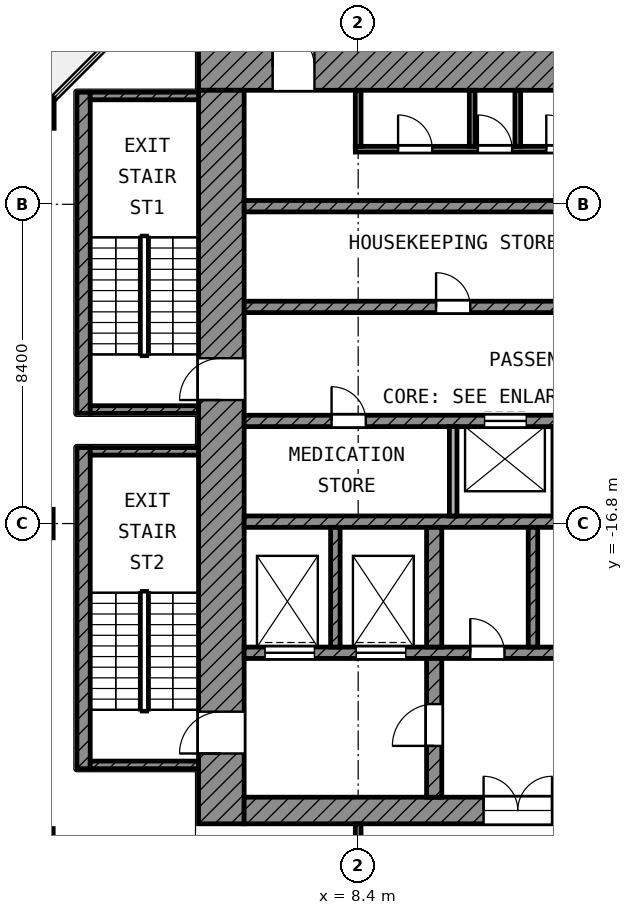
"""IFC4 building model, lengths in metres.
Left out: names, types, materials, properties, quantities, classifications, styles, units other than length and angle.
Written with IfcOpenShell. Run it as: python <this file> out.ifc"""

import sys

from ifc_helpers import new_model, si_unit, direction, frame, frame_2d, origin, origin_2d, place, context, subcontext, project, spatial, rectangle, extrude, element, fill, save


model = new_model("IFC4")
c1 = context("Model", 3, precision=1e-05, world=origin(), true_north=direction((0.0, 1.0)))
c2 = subcontext(c1, "Body", "Model", "MODEL_VIEW")
j1 = project(units=[si_unit("LENGTHUNIT", "METRE"), si_unit("PLANEANGLEUNIT", "RADIAN")], contexts=[c1])
p1 = place(None, origin())
s1 = spatial("IfcSite", under=j1, at=p1, CompositionType="ELEMENT")
p2 = place(p1, origin())
s2 = spatial("IfcBuilding", under=s1, at=p2, CompositionType="ELEMENT")
p3 = place(p2, frame((0.0, 0.0, 323.8)))
s3 = spatial("IfcBuildingStorey", under=s2, at=p3, CompositionType="ELEMENT", Elevation=323.8)
p4 = place(p3, frame((0.0, -6.0, 0.0), z_axis=(0.0, 0.0, 1.0), x_axis=(1.0, 0.0, 0.0)))
e1 = element("IfcColumn", 1, at=p4, inside=s3, PredefinedType="COLUMN", context=c2, shape_type="SweptSolid", body=[
    extrude(rectangle(XDim=0.8, YDim=0.8, at=origin_2d()), origin(), (0.0, 0.0, 1.0), 4.2),
])
for number, where, z_axis, x_axis in (
    (2, (0.0, -16.8, 0.0), (0.0, 0.0, 1.0), (1.0, 0.0, 0.0)),
    (3, (0.0, -25.2, 0.0), (0.0, 0.0, 1.0), (1.0, 0.0, 0.0)),
):
    element("IfcColumn", number, at=place(p3, frame(where, z_axis=z_axis, x_axis=x_axis)), inside=s3, PredefinedType="COLUMN", context=c2, shape_type="SweptSolid", body=[
        extrude(rectangle(XDim=0.75, YDim=0.75, at=origin_2d()), origin(), (0.0, 0.0, 1.0), 4.2),
    ])
p5 = place(p3, frame((4.2, -4.8, 0.0), z_axis=(0.0, 0.0, 1.0), x_axis=(1.0, 0.0, 0.0)))
e4 = element("IfcWall", 4, at=p5, inside=s3, PredefinedType="SHEAR", context=c2, shape_type="SweptSolid", body=[
    extrude(rectangle(XDim=20.5, YDim=1.2, at=frame_2d((10.25, 0.0))), origin(), (0.0, 0.0, 1.0), 3.6),
])
p6 = place(p5, frame((1.95, 0.0, 0.0)))
e5 = element("IfcOpeningElement", 5, at=p6, cuts=e4, PredefinedType="OPENING", context=c2, shape_type="SweptSolid", body=[
    extrude(rectangle(XDim=1.1, YDim=2.1, at=frame_2d((0.55, 1.05))), frame((0.0, 0.61, 0.0), z_axis=(0.0, -1.0, 0.0), x_axis=(1.0, 0.0, 0.0)), (0.0, 0.0, 1.0), 1.22),
])
p7 = place(p5, frame((17.95, 0.0, 0.0)))
e6 = element("IfcOpeningElement", 6, at=p7, cuts=e4, PredefinedType="OPENING", context=c2, shape_type="SweptSolid", body=[
    extrude(rectangle(XDim=1.1, YDim=2.1, at=frame_2d((0.55, 1.05))), frame((0.0, 0.61, 0.0), z_axis=(0.0, -1.0, 0.0), x_axis=(1.0, 0.0, 0.0)), (0.0, 0.0, 1.0), 1.22),
])
p8 = place(p3, frame((4.8, -24.7, 0.0), z_axis=(0.0, 0.0, 1.0), x_axis=(0.0, 1.0, 0.0)))
e7 = element("IfcWall", 7, at=p8, inside=s3, PredefinedType="SHEAR", context=c2, shape_type="SweptSolid", body=[
    extrude(rectangle(XDim=19.3, YDim=1.2, at=frame_2d((9.65, 0.0))), origin(), (0.0, 0.0, 1.0), 3.6),
])
p9 = place(p8, frame((11.15, 0.0, 0.0)))
e8 = element("IfcOpeningElement", 8, at=p9, cuts=e7, PredefinedType="OPENING", context=c2, shape_type="SweptSolid", body=[
    extrude(rectangle(XDim=1.1, YDim=2.1, at=frame_2d((0.55, 1.05))), frame((0.0, 0.61, 0.0), z_axis=(0.0, -1.0, 0.0), x_axis=(1.0, 0.0, 0.0)), (0.0, 0.0, 1.0), 1.22),
])
p10 = place(p8, frame((1.85, 0.0, 0.0)))
e9 = element("IfcOpeningElement", 9, at=p10, cuts=e7, PredefinedType="OPENING", context=c2, shape_type="SweptSolid", body=[
    extrude(rectangle(XDim=1.1, YDim=2.1, at=frame_2d((0.55, 1.05))), frame((0.0, 0.61, 0.0), z_axis=(0.0, -1.0, 0.0), x_axis=(1.0, 0.0, 0.0)), (0.0, 0.0, 1.0), 1.22),
])
p11 = place(p3, frame((5.4, -24.35, 0.0), z_axis=(0.0, 0.0, 1.0), x_axis=(1.0, 0.0, 0.0)))
e10 = element("IfcWall", 10, at=p11, inside=s3, PredefinedType="SHEAR", context=c2, shape_type="SweptSolid", body=[
    extrude(rectangle(XDim=18.6, YDim=0.7, at=frame_2d((9.3, 0.0))), origin(), (0.0, 0.0, 1.0), 3.6),
])
p12 = place(p11, frame((6.3, 0.0, 0.0)))
e11 = element("IfcOpeningElement", 11, at=p12, cuts=e10, PredefinedType="OPENING", context=c2, shape_type="SweptSolid", body=[
    extrude(rectangle(XDim=1.8, YDim=2.1, at=frame_2d((0.9, 1.05))), frame((0.0, 0.36, 0.0), z_axis=(0.0, -1.0, 0.0), x_axis=(1.0, 0.0, 0.0)), (0.0, 0.0, 1.0), 0.72),
])
p13 = place(p3, frame((5.4, -8.45, 0.0), z_axis=(0.0, 0.0, 1.0), x_axis=(1.0, 0.0, 0.0)))
e12 = element("IfcWall", 12, at=p13, inside=s3, PredefinedType="SHEAR", context=c2, shape_type="SweptSolid", body=[
    extrude(rectangle(XDim=16.65, YDim=0.3, at=frame_2d((8.325, 0.0))), origin(), (0.0, 0.0, 1.0), 3.6),
])
p14 = place(p3, frame((5.4, -11.1, 0.0), z_axis=(0.0, 0.0, 1.0), x_axis=(1.0, 0.0, 0.0)))
e13 = element("IfcWall", 13, at=p14, inside=s3, PredefinedType="SHEAR", context=c2, shape_type="SweptSolid", body=[
    extrude(rectangle(XDim=16.65, YDim=0.3, at=frame_2d((8.325, 0.0))), origin(), (0.0, 0.0, 1.0), 3.6),
])
p15 = place(p14, frame((5.05, 0.0, 0.0)))
e14 = element("IfcOpeningElement", 14, at=p15, cuts=e13, PredefinedType="OPENING", context=c2, shape_type="SweptSolid", body=[
    extrude(rectangle(XDim=0.9, YDim=2.1, at=frame_2d((0.45, 1.05))), frame((0.0, 0.16, 0.0), z_axis=(0.0, -1.0, 0.0), x_axis=(1.0, 0.0, 0.0)), (0.0, 0.0, 1.0), 0.32),
])
p16 = place(p14, frame((13.3, 0.0, 0.0)))
e15 = element("IfcOpeningElement", 15, at=p16, cuts=e13, PredefinedType="OPENING", context=c2, shape_type="SweptSolid", body=[
    extrude(rectangle(XDim=0.9, YDim=2.1, at=frame_2d((0.45, 1.05))), frame((0.0, 0.16, 0.0), z_axis=(0.0, -1.0, 0.0), x_axis=(1.0, 0.0, 0.0)), (0.0, 0.0, 1.0), 0.32),
])
p17 = place(p3, frame((5.4, -14.1, 0.0), z_axis=(0.0, 0.0, 1.0), x_axis=(1.0, 0.0, 0.0)))
e16 = element("IfcWall", 16, at=p17, inside=s3, PredefinedType="SHEAR", context=c2, shape_type="SweptSolid", body=[
    extrude(rectangle(XDim=16.65, YDim=0.3, at=frame_2d((8.325, 0.0))), origin(), (0.0, 0.0, 1.0), 3.6),
])
p18 = place(p17, frame((6.325, 0.0, 0.0)))
e17 = element("IfcOpeningElement", 17, at=p18, cuts=e16, PredefinedType="OPENING", context=c2, shape_type="SweptSolid", body=[
    extrude(rectangle(XDim=1.1, YDim=2.1, at=frame_2d((0.55, 1.05))), frame((0.0, 0.16, 0.0), z_axis=(0.0, -1.0, 0.0), x_axis=(1.0, 0.0, 0.0)), (0.0, 0.0, 1.0), 0.32),
])
p19 = place(p17, frame((9.075, 0.0, 0.0)))
e18 = element("IfcOpeningElement", 18, at=p19, cuts=e16, PredefinedType="OPENING", context=c2, shape_type="SweptSolid", body=[
    extrude(rectangle(XDim=1.1, YDim=2.1, at=frame_2d((0.55, 1.05))), frame((0.0, 0.16, 0.0), z_axis=(0.0, -1.0, 0.0), x_axis=(1.0, 0.0, 0.0)), (0.0, 0.0, 1.0), 0.32),
])
p20 = place(p17, frame((11.825, 0.0, 0.0)))
e19 = element("IfcOpeningElement", 19, at=p20, cuts=e16, PredefinedType="OPENING", context=c2, shape_type="SweptSolid", body=[
    extrude(rectangle(XDim=1.1, YDim=2.1, at=frame_2d((0.55, 1.05))), frame((0.0, 0.16, 0.0), z_axis=(0.0, -1.0, 0.0), x_axis=(1.0, 0.0, 0.0)), (0.0, 0.0, 1.0), 0.32),
])
p21 = place(p17, frame((14.575, 0.0, 0.0)))
e20 = element("IfcOpeningElement", 20, at=p21, cuts=e16, PredefinedType="OPENING", context=c2, shape_type="SweptSolid", body=[
    extrude(rectangle(XDim=1.1, YDim=2.1, at=frame_2d((0.55, 1.05))), frame((0.0, 0.16, 0.0), z_axis=(0.0, -1.0, 0.0), x_axis=(1.0, 0.0, 0.0)), (0.0, 0.0, 1.0), 0.32),
])
p22 = place(p17, frame((2.3, 0.0, 0.0)))
e21 = element("IfcOpeningElement", 21, at=p22, cuts=e16, PredefinedType="OPENING", context=c2, shape_type="SweptSolid", body=[
    extrude(rectangle(XDim=0.9, YDim=2.1, at=frame_2d((0.45, 1.05))), frame((0.0, 0.16, 0.0), z_axis=(0.0, -1.0, 0.0), x_axis=(1.0, 0.0, 0.0)), (0.0, 0.0, 1.0), 0.32),
])
p23 = place(p3, frame((5.4, -16.75, 0.0), z_axis=(0.0, 0.0, 1.0), x_axis=(1.0, 0.0, 0.0)))
e22 = element("IfcWall", 22, at=p23, inside=s3, PredefinedType="SHEAR", context=c2, shape_type="SweptSolid", body=[
    extrude(rectangle(XDim=16.65, YDim=0.3, at=frame_2d((8.325, 0.0))), origin(), (0.0, 0.0, 1.0), 3.6),
])
p24 = place(p3, frame((5.4, -20.2, 0.0), z_axis=(0.0, 0.0, 1.0), x_axis=(1.0, 0.0, 0.0)))
e23 = element("IfcWall", 23, at=p24, inside=s3, PredefinedType="SHEAR", context=c2, shape_type="SweptSolid", body=[
    extrude(rectangle(XDim=14.65, YDim=0.3, at=frame_2d((7.325, 0.0))), origin(), (0.0, 0.0, 1.0), 3.6),
])
p25 = place(p24, frame((10.55, 0.0, 0.0)))
e24 = element("IfcOpeningElement", 24, at=p25, cuts=e23, PredefinedType="OPENING", context=c2, shape_type="SweptSolid", body=[
    extrude(rectangle(XDim=1.3, YDim=2.1, at=frame_2d((0.65, 1.05))), frame((0.0, 0.16, 0.0), z_axis=(0.0, -1.0, 0.0), x_axis=(1.0, 0.0, 0.0)), (0.0, 0.0, 1.0), 0.32),
])
p26 = place(p24, frame((12.95, 0.0, 0.0)))
e25 = element("IfcOpeningElement", 25, at=p26, cuts=e23, PredefinedType="OPENING", context=c2, shape_type="SweptSolid", body=[
    extrude(rectangle(XDim=1.3, YDim=2.1, at=frame_2d((0.65, 1.05))), frame((0.0, 0.16, 0.0), z_axis=(0.0, -1.0, 0.0), x_axis=(1.0, 0.0, 0.0)), (0.0, 0.0, 1.0), 0.32),
])
p27 = place(p24, frame((0.55, 0.0, 0.0)))
e26 = element("IfcOpeningElement", 26, at=p27, cuts=e23, PredefinedType="OPENING", context=c2, shape_type="SweptSolid", body=[
    extrude(rectangle(XDim=1.3, YDim=2.1, at=frame_2d((0.65, 1.05))), frame((0.0, 0.16, 0.0), z_axis=(0.0, -1.0, 0.0), x_axis=(1.0, 0.0, 0.0)), (0.0, 0.0, 1.0), 0.32),
])
p28 = place(p24, frame((2.95, 0.0, 0.0)))
e27 = element("IfcOpeningElement", 27, at=p28, cuts=e23, PredefinedType="OPENING", context=c2, shape_type="SweptSolid", body=[
    extrude(rectangle(XDim=1.3, YDim=2.1, at=frame_2d((0.65, 1.05))), frame((0.0, 0.16, 0.0), z_axis=(0.0, -1.0, 0.0), x_axis=(1.0, 0.0, 0.0)), (0.0, 0.0, 1.0), 0.32),
])
p29 = place(p24, frame((5.95, 0.0, 0.0)))
e28 = element("IfcOpeningElement", 28, at=p29, cuts=e23, PredefinedType="OPENING", context=c2, shape_type="SweptSolid", body=[
    extrude(rectangle(XDim=0.9, YDim=2.1, at=frame_2d((0.45, 1.05))), frame((0.0, 0.16, 0.0), z_axis=(0.0, -1.0, 0.0), x_axis=(1.0, 0.0, 0.0)), (0.0, 0.0, 1.0), 0.32),
])
p30 = place(p24, frame((8.35, 0.0, 0.0)))
e29 = element("IfcOpeningElement", 29, at=p30, cuts=e23, PredefinedType="OPENING", context=c2, shape_type="SweptSolid", body=[
    extrude(rectangle(XDim=0.9, YDim=2.1, at=frame_2d((0.45, 1.05))), frame((0.0, 0.16, 0.0), z_axis=(0.0, -1.0, 0.0), x_axis=(1.0, 0.0, 0.0)), (0.0, 0.0, 1.0), 0.32),
])
p31 = place(p3, frame((10.4, -24.0, 0.0), z_axis=(0.0, 0.0, 1.0), x_axis=(0.0, 1.0, 0.0)))
e30 = element("IfcWall", 30, at=p31, inside=s3, PredefinedType="SHEAR", context=c2, shape_type="SweptSolid", body=[
    extrude(rectangle(XDim=3.65, YDim=0.4, at=frame_2d((1.825, 0.0))), origin(), (0.0, 0.0, 1.0), 3.6),
])
p32 = place(p31, frame((1.35, 0.0, 0.0)))
e31 = element("IfcOpeningElement", 31, at=p32, cuts=e30, PredefinedType="OPENING", context=c2, shape_type="SweptSolid", body=[
    extrude(rectangle(XDim=1.1, YDim=2.1, at=frame_2d((0.55, 1.05))), frame((0.0, 0.21, 0.0), z_axis=(0.0, -1.0, 0.0), x_axis=(1.0, 0.0, 0.0)), (0.0, 0.0, 1.0), 0.42),
])
p33 = place(p3, frame((10.4, -20.05, 0.0), z_axis=(0.0, 0.0, 1.0), x_axis=(0.0, 1.0, 0.0)))
e32 = element("IfcWall", 32, at=p33, inside=s3, PredefinedType="SHEAR", context=c2, shape_type="SweptSolid", body=[
    extrude(rectangle(XDim=3.15, YDim=0.4, at=frame_2d((1.575, 0.0))), origin(), (0.0, 0.0, 1.0), 3.6),
])
for number, where, z_axis, x_axis in (
    (33, (7.8, -20.05, 0.0), (0.0, 0.0, 1.0), (0.0, 1.0, 0.0)),
    (34, (13.0, -20.05, 0.0), (0.0, 0.0, 1.0), (0.0, 1.0, 0.0)),
):
    element("IfcWall", number, at=place(p3, frame(where, z_axis=z_axis, x_axis=x_axis)), inside=s3, PredefinedType="SHEAR", context=c2, shape_type="SweptSolid", body=[
        extrude(rectangle(XDim=3.15, YDim=0.25, at=frame_2d((1.575, 0.0))), origin(), (0.0, 0.0, 1.0), 3.6),
    ])
p34 = place(p3, frame((10.9, -16.6, 0.0), z_axis=(0.0, 0.0, 1.0), x_axis=(0.0, 1.0, 0.0)))
e35 = element("IfcWall", 35, at=p34, inside=s3, PredefinedType="PARTITIONING", context=c2, shape_type="SweptSolid", body=[
    extrude(rectangle(XDim=2.35, YDim=0.2, at=frame_2d((1.175, 0.0))), origin(), (0.0, 0.0, 1.0), 3.6),
])
p35 = place(p3, frame((8.325, -6.95, 0.0), z_axis=(0.0, 0.0, 1.0), x_axis=(1.0, 0.0, 0.0)))
e36 = element("IfcWall", 36, at=p35, inside=s3, PredefinedType="PARTITIONING", context=c2, shape_type="SweptSolid", body=[
    extrude(rectangle(XDim=12.75, YDim=0.15, at=frame_2d((6.375, 0.0))), origin(), (0.0, 0.0, 1.0), 3.6),
])
p36 = place(p35, frame((1.125, 0.0, 0.0)))
e37 = element("IfcOpeningElement", 37, at=p36, cuts=e36, PredefinedType="OPENING", context=c2, shape_type="SweptSolid", body=[
    extrude(rectangle(XDim=0.9, YDim=2.1, at=frame_2d((0.45, 1.05))), frame((0.0, 0.085, 0.0), z_axis=(0.0, -1.0, 0.0), x_axis=(1.0, 0.0, 0.0)), (0.0, 0.0, 1.0), 0.17),
])
p37 = place(p35, frame((3.225, 0.0, 0.0)))
e38 = element("IfcOpeningElement", 38, at=p37, cuts=e36, PredefinedType="OPENING", context=c2, shape_type="SweptSolid", body=[
    extrude(rectangle(XDim=0.9, YDim=2.1, at=frame_2d((0.45, 1.05))), frame((0.0, 0.085, 0.0), z_axis=(0.0, -1.0, 0.0), x_axis=(1.0, 0.0, 0.0)), (0.0, 0.0, 1.0), 0.17),
])
p38 = place(p35, frame((5.025, 0.0, 0.0)))
e39 = element("IfcOpeningElement", 39, at=p38, cuts=e36, PredefinedType="OPENING", context=c2, shape_type="SweptSolid", body=[
    extrude(rectangle(XDim=0.9, YDim=2.1, at=frame_2d((0.45, 1.05))), frame((0.0, 0.085, 0.0), z_axis=(0.0, -1.0, 0.0), x_axis=(1.0, 0.0, 0.0)), (0.0, 0.0, 1.0), 0.17),
])
p39 = place(p35, frame((7.425, 0.0, 0.0)))
e40 = element("IfcOpeningElement", 40, at=p39, cuts=e36, PredefinedType="OPENING", context=c2, shape_type="SweptSolid", body=[
    extrude(rectangle(XDim=0.9, YDim=2.1, at=frame_2d((0.45, 1.05))), frame((0.0, 0.085, 0.0), z_axis=(0.0, -1.0, 0.0), x_axis=(1.0, 0.0, 0.0)), (0.0, 0.0, 1.0), 0.17),
])
p40 = place(p35, frame((9.525, 0.0, 0.0)))
e41 = element("IfcOpeningElement", 41, at=p40, cuts=e36, PredefinedType="OPENING", context=c2, shape_type="SweptSolid", body=[
    extrude(rectangle(XDim=0.9, YDim=2.1, at=frame_2d((0.45, 1.05))), frame((0.0, 0.085, 0.0), z_axis=(0.0, -1.0, 0.0), x_axis=(1.0, 0.0, 0.0)), (0.0, 0.0, 1.0), 0.17),
])
p41 = place(p35, frame((11.325, 0.0, 0.0)))
e42 = element("IfcOpeningElement", 42, at=p41, cuts=e36, PredefinedType="OPENING", context=c2, shape_type="SweptSolid", body=[
    extrude(rectangle(XDim=0.9, YDim=2.1, at=frame_2d((0.45, 1.05))), frame((0.0, 0.085, 0.0), z_axis=(0.0, -1.0, 0.0), x_axis=(1.0, 0.0, 0.0)), (0.0, 0.0, 1.0), 0.17),
])
for number, where, z_axis, x_axis in (
    (43, (8.4, -6.875, 0.0), (0.0, 0.0, 1.0), (0.0, 1.0, 0.0)),
    (44, (11.4, -6.875, 0.0), (0.0, 0.0, 1.0), (0.0, 1.0, 0.0)),
    (45, (12.6, -6.875, 0.0), (0.0, 0.0, 1.0), (0.0, 1.0, 0.0)),
):
    element("IfcWall", number, at=place(p3, frame(where, z_axis=z_axis, x_axis=x_axis)), inside=s3, PredefinedType="PARTITIONING", context=c2, shape_type="SweptSolid", body=[
        extrude(rectangle(XDim=1.475, YDim=0.15, at=frame_2d((0.738, 0.0))), origin(), (0.0, 0.0, 1.0), 3.6),
    ])
p42 = place(p3, frame((1.175, -13.9, 0.0), z_axis=(0.0, 0.0, 1.0), x_axis=(0.0, 1.0, 0.0)))
e46 = element("IfcWall", 46, at=p42, inside=s3, PredefinedType="SHEAR", context=c2, shape_type="SweptSolid", body=[
    extrude(rectangle(XDim=8.45, YDim=0.35, at=frame_2d((4.225, 0.0))), origin(), (0.0, 0.0, 1.0), 3.6),
])
for number, where, z_axis, x_axis in (
    (47, (1.35, -5.55, 0.0), (0.0, 0.0, 1.0), (1.0, 0.0, 0.0)),
    (48, (1.35, -13.8, 0.0), (0.0, 0.0, 1.0), (1.0, 0.0, 0.0)),
):
    element("IfcWall", number, at=place(p3, frame(where, z_axis=z_axis, x_axis=x_axis)), inside=s3, PredefinedType="SHEAR", context=c2, shape_type="SweptSolid", body=[
        extrude(rectangle(XDim=2.85, YDim=0.2, at=frame_2d((1.425, 0.0))), origin(), (0.0, 0.0, 1.0), 3.6),
    ])
p43 = place(p3, frame((1.175, -23.25, 0.0), z_axis=(0.0, 0.0, 1.0), x_axis=(0.0, 1.0, 0.0)))
e49 = element("IfcWall", 49, at=p43, inside=s3, PredefinedType="SHEAR", context=c2, shape_type="SweptSolid", body=[
    extrude(rectangle(XDim=8.45, YDim=0.35, at=frame_2d((4.225, 0.0))), origin(), (0.0, 0.0, 1.0), 3.6),
])
for number, where, z_axis, x_axis in (
    (50, (1.35, -14.9, 0.0), (0.0, 0.0, 1.0), (1.0, 0.0, 0.0)),
    (51, (1.35, -23.15, 0.0), (0.0, 0.0, 1.0), (1.0, 0.0, 0.0)),
):
    element("IfcWall", number, at=place(p3, frame(where, z_axis=z_axis, x_axis=x_axis)), inside=s3, PredefinedType="SHEAR", context=c2, shape_type="SweptSolid", body=[
        extrude(rectangle(XDim=2.85, YDim=0.2, at=frame_2d((1.425, 0.0))), origin(), (0.0, 0.0, 1.0), 3.6),
    ])
p44 = place(p3, frame((8.4, -31.957, 0.0), z_axis=(0.0, 0.0, 1.0), x_axis=(0.0, 1.0, 0.0)))
e52 = element("IfcWall", 52, at=p44, inside=s3, PredefinedType="PARTITIONING", context=c2, shape_type="SweptSolid", body=[
    extrude(rectangle(XDim=7.257, YDim=0.15, at=frame_2d((3.628, 0.0))), origin(), (0.0, 0.0, 1.0), 3.6),
])
p45 = place(p18, origin())
e53 = element("IfcDoor", 53, at=p45, inside=s3, OperationType="DOUBLE_DOOR_SLIDING", PredefinedType="DOOR", context=c2, shape_type="SweptSolid", body=[
    extrude(rectangle(XDim=1.1, YDim=2.1, at=frame_2d((0.55, 1.05))), frame((0.0, 0.025, 0.0), z_axis=(0.0, -1.0, 0.0), x_axis=(1.0, 0.0, 0.0)), (0.0, 0.0, 1.0), 0.05),
])
fill(e17, e53)
p46 = place(p27, origin())
e54 = element("IfcDoor", 54, at=p46, inside=s3, OperationType="DOUBLE_DOOR_SLIDING", PredefinedType="DOOR", context=c2, shape_type="SweptSolid", body=[
    extrude(rectangle(XDim=1.3, YDim=2.1, at=frame_2d((0.65, 1.05))), frame((0.0, 0.025, 0.0), z_axis=(0.0, -1.0, 0.0), x_axis=(1.0, 0.0, 0.0)), (0.0, 0.0, 1.0), 0.05),
])
fill(e26, e54)
p47 = place(p28, origin())
e55 = element("IfcDoor", 55, at=p47, inside=s3, OperationType="DOUBLE_DOOR_SLIDING", PredefinedType="DOOR", context=c2, shape_type="SweptSolid", body=[
    extrude(rectangle(XDim=1.3, YDim=2.1, at=frame_2d((0.65, 1.05))), frame((0.0, 0.025, 0.0), z_axis=(0.0, -1.0, 0.0), x_axis=(1.0, 0.0, 0.0)), (0.0, 0.0, 1.0), 0.05),
])
fill(e27, e55)
p48 = place(p9, origin())
e56 = element("IfcDoor", 56, at=p48, inside=s3, OperationType="SINGLE_SWING_LEFT", PredefinedType="DOOR", context=c2, shape_type="SweptSolid", body=[
    extrude(rectangle(XDim=1.1, YDim=2.1, at=frame_2d((0.55, 1.05))), frame((0.0, 0.025, 0.0), z_axis=(0.0, -1.0, 0.0), x_axis=(1.0, 0.0, 0.0)), (0.0, 0.0, 1.0), 0.05),
])
fill(e8, e56)
p49 = place(p10, origin())
e57 = element("IfcDoor", 57, at=p49, inside=s3, OperationType="SINGLE_SWING_LEFT", PredefinedType="DOOR", context=c2, shape_type="SweptSolid", body=[
    extrude(rectangle(XDim=1.1, YDim=2.1, at=frame_2d((0.55, 1.05))), frame((0.0, 0.025, 0.0), z_axis=(0.0, -1.0, 0.0), x_axis=(1.0, 0.0, 0.0)), (0.0, 0.0, 1.0), 0.05),
])
fill(e9, e57)
p50 = place(p6, origin())
e58 = element("IfcDoor", 58, at=p50, inside=s3, OperationType="SINGLE_SWING_LEFT", PredefinedType="DOOR", context=c2, shape_type="SweptSolid", body=[
    extrude(rectangle(XDim=1.1, YDim=2.1, at=frame_2d((0.55, 1.05))), frame((0.0, 0.025, 0.0), z_axis=(0.0, -1.0, 0.0), x_axis=(1.0, 0.0, 0.0)), (0.0, 0.0, 1.0), 0.05),
])
fill(e5, e58)
p51 = place(p32, origin())
e59 = element("IfcDoor", 59, at=p51, inside=s3, OperationType="SINGLE_SWING_LEFT", PredefinedType="DOOR", context=c2, shape_type="SweptSolid", body=[
    extrude(rectangle(XDim=1.1, YDim=2.1, at=frame_2d((0.55, 1.05))), frame((0.0, 0.025, 0.0), z_axis=(0.0, -1.0, 0.0), x_axis=(1.0, 0.0, 0.0)), (0.0, 0.0, 1.0), 0.05),
])
fill(e31, e59)
p52 = place(p12, origin())
e60 = element("IfcDoor", 60, at=p52, inside=s3, OperationType="DOUBLE_DOOR_SINGLE_SWING", PredefinedType="DOOR", context=c2, shape_type="SweptSolid", body=[
    extrude(rectangle(XDim=1.8, YDim=2.1, at=frame_2d((0.9, 1.05))), frame((0.0, 0.025, 0.0), z_axis=(0.0, -1.0, 0.0), x_axis=(1.0, 0.0, 0.0)), (0.0, 0.0, 1.0), 0.05),
])
fill(e11, e60)
p53 = place(p36, origin())
e61 = element("IfcDoor", 61, at=p53, inside=s3, OperationType="SINGLE_SWING_LEFT", PredefinedType="DOOR", context=c2, shape_type="SweptSolid", body=[
    extrude(rectangle(XDim=0.9, YDim=2.1, at=frame_2d((0.45, 1.05))), frame((0.0, 0.025, 0.0), z_axis=(0.0, -1.0, 0.0), x_axis=(1.0, 0.0, 0.0)), (0.0, 0.0, 1.0), 0.05),
])
fill(e37, e61)
p54 = place(p37, origin())
e62 = element("IfcDoor", 62, at=p54, inside=s3, OperationType="SINGLE_SWING_LEFT", PredefinedType="DOOR", context=c2, shape_type="SweptSolid", body=[
    extrude(rectangle(XDim=0.9, YDim=2.1, at=frame_2d((0.45, 1.05))), frame((0.0, 0.025, 0.0), z_axis=(0.0, -1.0, 0.0), x_axis=(1.0, 0.0, 0.0)), (0.0, 0.0, 1.0), 0.05),
])
fill(e38, e62)
p55 = place(p38, origin())
e63 = element("IfcDoor", 63, at=p55, inside=s3, OperationType="SINGLE_SWING_LEFT", PredefinedType="DOOR", context=c2, shape_type="SweptSolid", body=[
    extrude(rectangle(XDim=0.9, YDim=2.1, at=frame_2d((0.45, 1.05))), frame((0.0, 0.025, 0.0), z_axis=(0.0, -1.0, 0.0), x_axis=(1.0, 0.0, 0.0)), (0.0, 0.0, 1.0), 0.05),
])
fill(e39, e63)
p56 = place(p29, origin())
e64 = element("IfcDoor", 64, at=p56, inside=s3, OperationType="SINGLE_SWING_LEFT", PredefinedType="DOOR", context=c2, shape_type="SweptSolid", body=[
    extrude(rectangle(XDim=0.9, YDim=2.1, at=frame_2d((0.45, 1.05))), frame((0.0, 0.025, 0.0), z_axis=(0.0, -1.0, 0.0), x_axis=(1.0, 0.0, 0.0)), (0.0, 0.0, 1.0), 0.05),
])
fill(e28, e64)
p57 = place(p15, origin())
e65 = element("IfcDoor", 65, at=p57, inside=s3, OperationType="SINGLE_SWING_LEFT", PredefinedType="DOOR", context=c2, shape_type="SweptSolid", body=[
    extrude(rectangle(XDim=0.9, YDim=2.1, at=frame_2d((0.45, 1.05))), frame((0.0, 0.025, 0.0), z_axis=(0.0, -1.0, 0.0), x_axis=(1.0, 0.0, 0.0)), (0.0, 0.0, 1.0), 0.05),
])
fill(e14, e65)
p58 = place(p22, origin())
e66 = element("IfcDoor", 66, at=p58, inside=s3, OperationType="SINGLE_SWING_LEFT", PredefinedType="DOOR", context=c2, shape_type="SweptSolid", body=[
    extrude(rectangle(XDim=0.9, YDim=2.1, at=frame_2d((0.45, 1.05))), frame((0.0, 0.025, 0.0), z_axis=(0.0, -1.0, 0.0), x_axis=(1.0, 0.0, 0.0)), (0.0, 0.0, 1.0), 0.05),
])
fill(e21, e66)
save(model, sys.argv[1])
